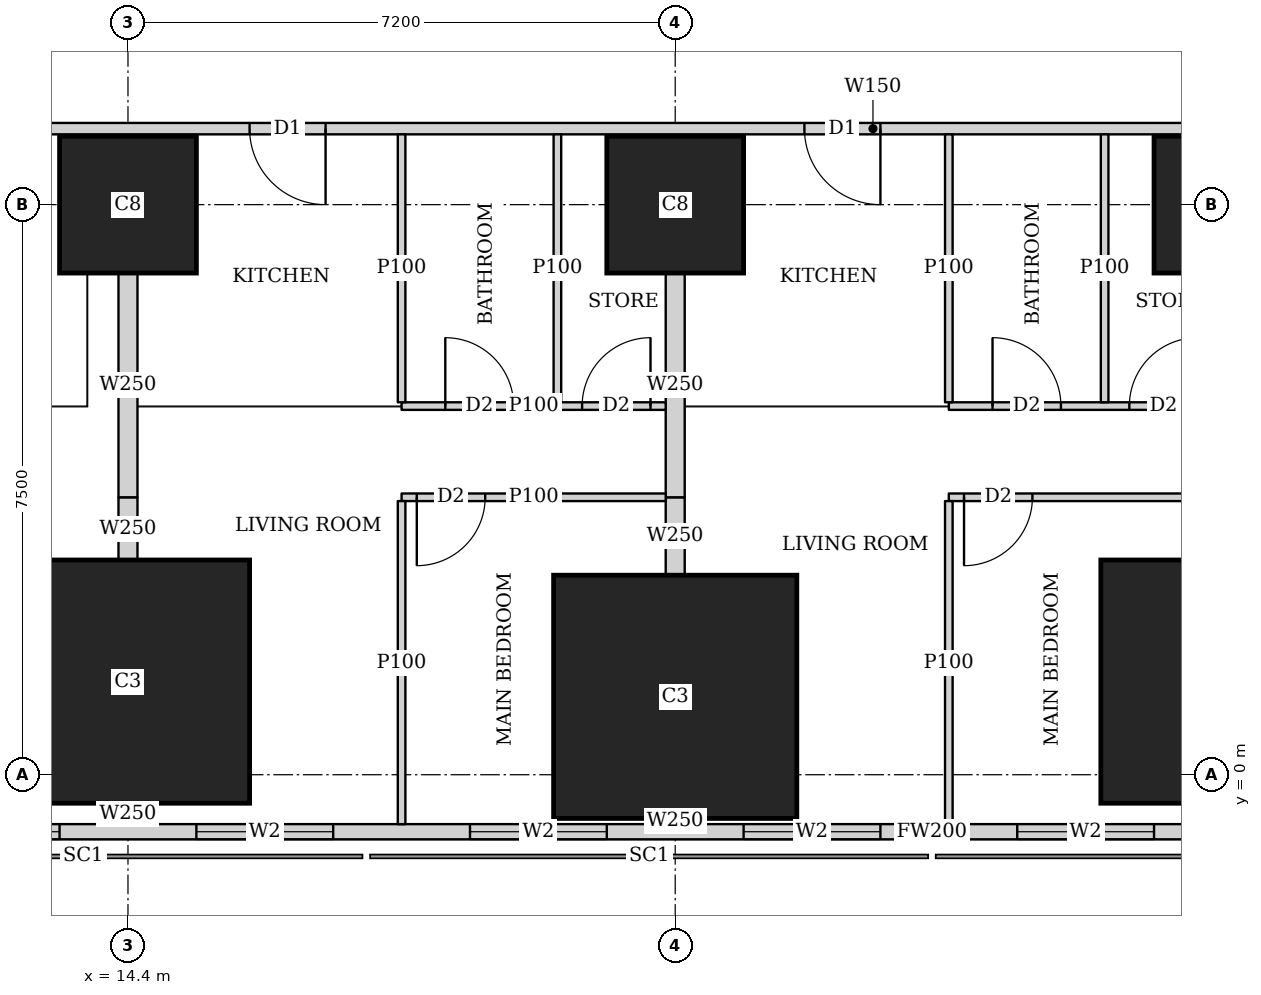
"""IFC4 building model, lengths in metres.
Left out: names, types, materials, properties, quantities, classifications, styles, units other than length and angle.
Written with IfcOpenShell. Run it as: python <this file> out.ifc"""

import sys

from ifc_helpers import new_model, si_unit, direction, frame, frame_2d, origin, origin_2d, place, context, subcontext, project, spatial, rectangle, extrude, element, fill, save


model = new_model("IFC4")
c1 = context("Model", 3, precision=1e-05, world=origin(), true_north=direction((0.0, 1.0)))
c2 = subcontext(c1, "Body", "Model", "MODEL_VIEW")
j1 = project(units=[si_unit("LENGTHUNIT", "METRE"), si_unit("PLANEANGLEUNIT", "RADIAN")], contexts=[c1])
p1 = place(None, origin())
s1 = spatial("IfcSite", under=j1, at=p1, CompositionType="ELEMENT")
p2 = place(p1, origin())
s2 = spatial("IfcBuilding", under=s1, at=p2, CompositionType="ELEMENT")
p3 = place(p2, frame((0.0, 0.0, 20.0)))
s3 = spatial("IfcBuildingStorey", under=s2, at=p3, CompositionType="ELEMENT", Elevation=20.0)
p4 = place(p3, frame((14.4, 1.225, 0.0), z_axis=(0.0, 0.0, 1.0), x_axis=(1.0, 0.0, 0.0)))
e1 = element("IfcColumn", 1, at=p4, inside=s3, PredefinedType="COLUMN", context=c2, shape_type="SweptSolid", body=[
    extrude(rectangle(XDim=3.2, YDim=3.2, at=origin_2d()), origin(), (0.0, 0.0, 1.0), 3.75),
])
p5 = place(p3, frame((21.6, 1.025, -0.3), z_axis=(0.0, 0.0, 1.0), x_axis=(1.0, 0.0, 0.0)))
e2 = element("IfcColumn", 2, at=p5, inside=s3, PredefinedType="COLUMN", context=c2, shape_type="SweptSolid", body=[
    extrude(rectangle(XDim=3.2, YDim=3.2, at=origin_2d()), origin(), (0.0, 0.0, 1.0), 4.05),
])
p6 = place(p3, frame((28.8, 1.225, 0.0), z_axis=(0.0, 0.0, 1.0), x_axis=(1.0, 0.0, 0.0)))
e3 = element("IfcColumn", 3, at=p6, inside=s3, PredefinedType="COLUMN", context=c2, shape_type="SweptSolid", body=[
    extrude(rectangle(XDim=3.2, YDim=3.2, at=origin_2d()), origin(), (0.0, 0.0, 1.0), 3.75),
])
for number, where, z_axis, x_axis in (
    (4, (14.4, 7.5, 0.0), (0.0, 0.0, 1.0), (1.0, 0.0, 0.0)),
    (5, (21.6, 7.5, 0.0), (0.0, 0.0, 1.0), (1.0, 0.0, 0.0)),
    (6, (28.8, 7.5, 0.0), (0.0, 0.0, 1.0), (1.0, 0.0, 0.0)),
):
    element("IfcColumn", number, at=place(p3, frame(where, z_axis=z_axis, x_axis=x_axis)), inside=s3, PredefinedType="COLUMN", context=c2, shape_type="SweptSolid", body=[
        extrude(rectangle(XDim=1.8, YDim=1.8, at=origin_2d()), origin(), (0.0, 0.0, 1.0), 3.75),
    ])
p7 = place(p3, frame((2.163, -0.75, 0.0), z_axis=(0.0, 0.0, 1.0), x_axis=(1.0, 0.0, 0.0)))
e7 = element("IfcWall", 7, at=p7, inside=s3, PredefinedType="SOLIDWALL", context=c2, shape_type="SweptSolid", body=[
    extrude(rectangle(XDim=45.628, YDim=0.2, at=frame_2d((22.814, 0.0))), origin(), (0.0, 0.0, 1.0), 3.5),
])
p8 = place(p7, frame((9.537, 0.0, 0.9)))
e8 = element("IfcOpeningElement", 8, at=p8, cuts=e7, PredefinedType="OPENING", context=c2, shape_type="SweptSolid", body=[
    extrude(rectangle(XDim=1.8, YDim=1.5, at=frame_2d((0.9, 0.75))), frame((0.0, 0.11, 0.0), z_axis=(0.0, -1.0, 0.0), x_axis=(1.0, 0.0, 0.0)), (0.0, 0.0, 1.0), 0.22),
])
p9 = place(p7, frame((13.137, 0.0, 0.9)))
e9 = element("IfcOpeningElement", 9, at=p9, cuts=e7, PredefinedType="OPENING", context=c2, shape_type="SweptSolid", body=[
    extrude(rectangle(XDim=1.8, YDim=1.5, at=frame_2d((0.9, 0.75))), frame((0.0, 0.11, 0.0), z_axis=(0.0, -1.0, 0.0), x_axis=(1.0, 0.0, 0.0)), (0.0, 0.0, 1.0), 0.22),
])
p10 = place(p7, frame((16.737, 0.0, 0.9)))
e10 = element("IfcOpeningElement", 10, at=p10, cuts=e7, PredefinedType="OPENING", context=c2, shape_type="SweptSolid", body=[
    extrude(rectangle(XDim=1.8, YDim=1.5, at=frame_2d((0.9, 0.75))), frame((0.0, 0.11, 0.0), z_axis=(0.0, -1.0, 0.0), x_axis=(1.0, 0.0, 0.0)), (0.0, 0.0, 1.0), 0.22),
])
p11 = place(p7, frame((20.337, 0.0, 0.9)))
e11 = element("IfcOpeningElement", 11, at=p11, cuts=e7, PredefinedType="OPENING", context=c2, shape_type="SweptSolid", body=[
    extrude(rectangle(XDim=1.8, YDim=1.5, at=frame_2d((0.9, 0.75))), frame((0.0, 0.11, 0.0), z_axis=(0.0, -1.0, 0.0), x_axis=(1.0, 0.0, 0.0)), (0.0, 0.0, 1.0), 0.22),
])
p12 = place(p7, frame((23.937, 0.0, 0.9)))
e12 = element("IfcOpeningElement", 12, at=p12, cuts=e7, PredefinedType="OPENING", context=c2, shape_type="SweptSolid", body=[
    extrude(rectangle(XDim=1.8, YDim=1.5, at=frame_2d((0.9, 0.75))), frame((0.0, 0.11, 0.0), z_axis=(0.0, -1.0, 0.0), x_axis=(1.0, 0.0, 0.0)), (0.0, 0.0, 1.0), 0.22),
])
p13 = place(p7, frame((27.537, 0.0, 0.9)))
e13 = element("IfcOpeningElement", 13, at=p13, cuts=e7, PredefinedType="OPENING", context=c2, shape_type="SweptSolid", body=[
    extrude(rectangle(XDim=1.8, YDim=1.5, at=frame_2d((0.9, 0.75))), frame((0.0, 0.11, 0.0), z_axis=(0.0, -1.0, 0.0), x_axis=(1.0, 0.0, 0.0)), (0.0, 0.0, 1.0), 0.22),
])
p14 = place(p7, frame((31.137, 0.0, 0.9)))
e14 = element("IfcOpeningElement", 14, at=p14, cuts=e7, PredefinedType="OPENING", context=c2, shape_type="SweptSolid", body=[
    extrude(rectangle(XDim=1.8, YDim=1.5, at=frame_2d((0.9, 0.75))), frame((0.0, 0.11, 0.0), z_axis=(0.0, -1.0, 0.0), x_axis=(1.0, 0.0, 0.0)), (0.0, 0.0, 1.0), 0.22),
])
p15 = place(p7, frame((34.737, 0.0, 0.9)))
e15 = element("IfcOpeningElement", 15, at=p15, cuts=e7, PredefinedType="OPENING", context=c2, shape_type="SweptSolid", body=[
    extrude(rectangle(XDim=1.8, YDim=1.5, at=frame_2d((0.9, 0.75))), frame((0.0, 0.11, 0.0), z_axis=(0.0, -1.0, 0.0), x_axis=(1.0, 0.0, 0.0)), (0.0, 0.0, 1.0), 0.22),
])
p16 = place(p3, frame((40.054, 8.5, 0.0), z_axis=(0.0, 0.0, 1.0), x_axis=(-1.0, 0.0, 0.0)))
e16 = element("IfcWall", 16, at=p16, inside=s3, PredefinedType="SOLIDWALL", context=c2, shape_type="SweptSolid", body=[
    extrude(rectangle(XDim=31.704, YDim=0.15, at=frame_2d((15.852, 0.0))), origin(), (0.0, 0.0, 1.0), 3.5),
])
p17 = place(p16, frame((27.321, 0.0, 0.0)))
e17 = element("IfcOpeningElement", 17, at=p17, cuts=e16, PredefinedType="OPENING", context=c2, shape_type="SweptSolid", body=[
    extrude(rectangle(XDim=1.0, YDim=2.1, at=frame_2d((0.5, 1.05))), frame((0.0, 0.085, 0.0), z_axis=(0.0, -1.0, 0.0), x_axis=(1.0, 0.0, 0.0)), (0.0, 0.0, 1.0), 0.17),
])
p18 = place(p16, frame((23.054, 0.0, 0.0)))
e18 = element("IfcOpeningElement", 18, at=p18, cuts=e16, PredefinedType="OPENING", context=c2, shape_type="SweptSolid", body=[
    extrude(rectangle(XDim=1.0, YDim=2.1, at=frame_2d((0.5, 1.05))), frame((0.0, 0.085, 0.0), z_axis=(0.0, -1.0, 0.0), x_axis=(1.0, 0.0, 0.0)), (0.0, 0.0, 1.0), 0.17),
])
p19 = place(p16, frame((15.754, 0.0, 0.0)))
e19 = element("IfcOpeningElement", 19, at=p19, cuts=e16, PredefinedType="OPENING", context=c2, shape_type="SweptSolid", body=[
    extrude(rectangle(XDim=1.0, YDim=2.1, at=frame_2d((0.5, 1.05))), frame((0.0, 0.085, 0.0), z_axis=(0.0, -1.0, 0.0), x_axis=(1.0, 0.0, 0.0)), (0.0, 0.0, 1.0), 0.17),
])
p20 = place(p16, frame((5.754, 0.0, 0.0)))
e20 = element("IfcOpeningElement", 20, at=p20, cuts=e16, PredefinedType="OPENING", context=c2, shape_type="SweptSolid", body=[
    extrude(rectangle(XDim=1.0, YDim=2.1, at=frame_2d((0.5, 1.05))), frame((0.0, 0.085, 0.0), z_axis=(0.0, -1.0, 0.0), x_axis=(1.0, 0.0, 0.0)), (0.0, 0.0, 1.0), 0.17),
])
p21 = place(p3, frame((21.475, 3.65, 0.0), z_axis=(0.0, 0.0, 1.0), x_axis=(-1.0, 0.0, 0.0)))
e21 = element("IfcWall", 21, at=p21, inside=s3, PredefinedType="PARTITIONING", context=c2, shape_type="SweptSolid", body=[
    extrude(rectangle(XDim=3.475, YDim=0.1, at=frame_2d((1.738, 0.0))), origin(), (0.0, 0.0, 1.0), 3.5),
])
p22 = place(p21, frame((2.375, 0.0, 0.0)))
e22 = element("IfcOpeningElement", 22, at=p22, cuts=e21, PredefinedType="OPENING", context=c2, shape_type="SweptSolid", body=[
    extrude(rectangle(XDim=0.9, YDim=2.1, at=frame_2d((0.45, 1.05))), frame((0.0, 0.06, 0.0), z_axis=(0.0, -1.0, 0.0), x_axis=(1.0, 0.0, 0.0)), (0.0, 0.0, 1.0), 0.12),
])
p23 = place(p3, frame((21.475, 4.85, 0.0), z_axis=(0.0, 0.0, 1.0), x_axis=(-1.0, 0.0, 0.0)))
e23 = element("IfcWall", 23, at=p23, inside=s3, PredefinedType="PARTITIONING", context=c2, shape_type="SweptSolid", body=[
    extrude(rectangle(XDim=3.475, YDim=0.1, at=frame_2d((1.738, 0.0))), origin(), (0.0, 0.0, 1.0), 3.5),
])
p24 = place(p23, frame((2.0, 0.0, 0.0)))
e24 = element("IfcOpeningElement", 24, at=p24, cuts=e23, PredefinedType="OPENING", context=c2, shape_type="SweptSolid", body=[
    extrude(rectangle(XDim=0.9, YDim=2.1, at=frame_2d((0.45, 1.05))), frame((0.0, 0.06, 0.0), z_axis=(0.0, -1.0, 0.0), x_axis=(1.0, 0.0, 0.0)), (0.0, 0.0, 1.0), 0.12),
])
p25 = place(p23, frame((0.2, 0.0, 0.0)))
e25 = element("IfcOpeningElement", 25, at=p25, cuts=e23, PredefinedType="OPENING", context=c2, shape_type="SweptSolid", body=[
    extrude(rectangle(XDim=0.9, YDim=2.1, at=frame_2d((0.45, 1.05))), frame((0.0, 0.06, 0.0), z_axis=(0.0, -1.0, 0.0), x_axis=(1.0, 0.0, 0.0)), (0.0, 0.0, 1.0), 0.12),
])
p26 = place(p3, frame((18.0, -0.65, 0.0), z_axis=(0.0, 0.0, 1.0), x_axis=(0.0, 1.0, 0.0)))
e26 = element("IfcWall", 26, at=p26, inside=s3, PredefinedType="PARTITIONING", context=c2, shape_type="SweptSolid", body=[
    extrude(rectangle(XDim=4.25, YDim=0.1, at=frame_2d((2.125, 0.0))), origin(), (0.0, 0.0, 1.0), 2.05),
])
for number, where, z_axis, x_axis in (
    (27, (18.0, 4.9, 0.0), (0.0, 0.0, 1.0), (0.0, 1.0, 0.0)),
    (28, (20.05, 4.9, 0.0), (0.0, 0.0, 1.0), (0.0, 1.0, 0.0)),
):
    element("IfcWall", number, at=place(p3, frame(where, z_axis=z_axis, x_axis=x_axis)), inside=s3, PredefinedType="PARTITIONING", context=c2, shape_type="SweptSolid", body=[
        extrude(rectangle(XDim=3.525, YDim=0.1, at=frame_2d((1.763, 0.0))), origin(), (0.0, 0.0, 1.0), 3.5),
    ])
p27 = place(p3, frame((14.4, -0.65, 0.0), z_axis=(0.0, 0.0, 1.0), x_axis=(0.0, 1.0, 0.0)))
e29 = element("IfcWall", 29, at=p27, inside=s3, PredefinedType="SOLIDWALL", context=c2, shape_type="SweptSolid", body=[
    extrude(rectangle(XDim=0.274, YDim=0.25, at=frame_2d((0.137, 0.0))), origin(), (0.0, 0.0, 1.0), 2.05),
])
p28 = place(p3, frame((14.4, 2.826, 0.0), z_axis=(0.0, 0.0, 1.0), x_axis=(0.0, 1.0, 0.0)))
e30 = element("IfcWall", 30, at=p28, inside=s3, PredefinedType="SOLIDWALL", context=c2, shape_type="SweptSolid", body=[
    extrude(rectangle(XDim=0.824, YDim=0.25, at=frame_2d((0.412, 0.0))), origin(), (0.0, 0.0, 1.0), 2.05),
])
p29 = place(p3, frame((14.4, 3.65, 0.0), z_axis=(0.0, 0.0, 1.0), x_axis=(0.0, 1.0, 0.0)))
e31 = element("IfcWall", 31, at=p29, inside=s3, PredefinedType="SOLIDWALL", context=c2, shape_type="SweptSolid", body=[
    extrude(rectangle(XDim=2.949, YDim=0.25, at=frame_2d((1.475, 0.0))), origin(), (0.0, 0.0, 1.0), 3.5),
])
p30 = place(p3, frame((32.275, 3.65, 0.0), z_axis=(0.0, 0.0, 1.0), x_axis=(-1.0, 0.0, 0.0)))
e32 = element("IfcWall", 32, at=p30, inside=s3, PredefinedType="PARTITIONING", context=c2, shape_type="SweptSolid", body=[
    extrude(rectangle(XDim=7.075, YDim=0.1, at=frame_2d((3.538, 0.0))), origin(), (0.0, 0.0, 1.0), 3.5),
])
p31 = place(p30, frame((5.975, 0.0, 0.0)))
e33 = element("IfcOpeningElement", 33, at=p31, cuts=e32, PredefinedType="OPENING", context=c2, shape_type="SweptSolid", body=[
    extrude(rectangle(XDim=0.9, YDim=2.1, at=frame_2d((0.45, 1.05))), frame((0.0, 0.06, 0.0), z_axis=(0.0, -1.0, 0.0), x_axis=(1.0, 0.0, 0.0)), (0.0, 0.0, 1.0), 0.12),
])
p32 = place(p30, frame((0.95, 0.0, 0.0)))
e34 = element("IfcOpeningElement", 34, at=p32, cuts=e32, PredefinedType="OPENING", context=c2, shape_type="SweptSolid", body=[
    extrude(rectangle(XDim=0.9, YDim=2.1, at=frame_2d((0.45, 1.05))), frame((0.0, 0.06, 0.0), z_axis=(0.0, -1.0, 0.0), x_axis=(1.0, 0.0, 0.0)), (0.0, 0.0, 1.0), 0.12),
])
p33 = place(p3, frame((32.275, 4.85, 0.0), z_axis=(0.0, 0.0, 1.0), x_axis=(-1.0, 0.0, 0.0)))
e35 = element("IfcWall", 35, at=p33, inside=s3, PredefinedType="PARTITIONING", context=c2, shape_type="SweptSolid", body=[
    extrude(rectangle(XDim=7.075, YDim=0.1, at=frame_2d((3.538, 0.0))), origin(), (0.0, 0.0, 1.0), 3.5),
])
p34 = place(p33, frame((5.6, 0.0, 0.0)))
e36 = element("IfcOpeningElement", 36, at=p34, cuts=e35, PredefinedType="OPENING", context=c2, shape_type="SweptSolid", body=[
    extrude(rectangle(XDim=0.9, YDim=2.1, at=frame_2d((0.45, 1.05))), frame((0.0, 0.06, 0.0), z_axis=(0.0, -1.0, 0.0), x_axis=(1.0, 0.0, 0.0)), (0.0, 0.0, 1.0), 0.12),
])
p35 = place(p33, frame((2.225, 0.0, 0.0)))
e37 = element("IfcOpeningElement", 37, at=p35, cuts=e35, PredefinedType="OPENING", context=c2, shape_type="SweptSolid", body=[
    extrude(rectangle(XDim=0.9, YDim=2.1, at=frame_2d((0.45, 1.05))), frame((0.0, 0.06, 0.0), z_axis=(0.0, -1.0, 0.0), x_axis=(1.0, 0.0, 0.0)), (0.0, 0.0, 1.0), 0.12),
])
p36 = place(p33, frame((3.8, 0.0, 0.0)))
e38 = element("IfcOpeningElement", 38, at=p36, cuts=e35, PredefinedType="OPENING", context=c2, shape_type="SweptSolid", body=[
    extrude(rectangle(XDim=0.9, YDim=2.1, at=frame_2d((0.45, 1.05))), frame((0.0, 0.06, 0.0), z_axis=(0.0, -1.0, 0.0), x_axis=(1.0, 0.0, 0.0)), (0.0, 0.0, 1.0), 0.12),
])
p37 = place(p33, frame((0.425, 0.0, 0.0)))
e39 = element("IfcOpeningElement", 39, at=p37, cuts=e35, PredefinedType="OPENING", context=c2, shape_type="SweptSolid", body=[
    extrude(rectangle(XDim=0.9, YDim=2.1, at=frame_2d((0.45, 1.05))), frame((0.0, 0.06, 0.0), z_axis=(0.0, -1.0, 0.0), x_axis=(1.0, 0.0, 0.0)), (0.0, 0.0, 1.0), 0.12),
])
p38 = place(p3, frame((25.2, -0.65, 0.0), z_axis=(0.0, 0.0, 1.0), x_axis=(0.0, 1.0, 0.0)))
e40 = element("IfcWall", 40, at=p38, inside=s3, PredefinedType="PARTITIONING", context=c2, shape_type="SweptSolid", body=[
    extrude(rectangle(XDim=4.25, YDim=0.1, at=frame_2d((2.125, 0.0))), origin(), (0.0, 0.0, 1.0), 2.05),
])
for number, where, z_axis, x_axis in (
    (41, (25.2, 4.9, 0.0), (0.0, 0.0, 1.0), (0.0, 1.0, 0.0)),
    (42, (27.25, 4.9, 0.0), (0.0, 0.0, 1.0), (0.0, 1.0, 0.0)),
):
    element("IfcWall", number, at=place(p3, frame(where, z_axis=z_axis, x_axis=x_axis)), inside=s3, PredefinedType="PARTITIONING", context=c2, shape_type="SweptSolid", body=[
        extrude(rectangle(XDim=3.525, YDim=0.1, at=frame_2d((1.763, 0.0))), origin(), (0.0, 0.0, 1.0), 3.5),
    ])
p39 = place(p3, frame((21.6, -0.65, 0.0), z_axis=(0.0, 0.0, 1.0), x_axis=(0.0, 1.0, 0.0)))
e43 = element("IfcWall", 43, at=p39, inside=s3, PredefinedType="SOLIDWALL", context=c2, shape_type="SweptSolid", body=[
    extrude(rectangle(XDim=0.074, YDim=0.25, at=frame_2d((0.037, 0.0))), origin(), (0.0, 0.0, 1.0), 2.05),
])
p40 = place(p3, frame((21.6, 2.626, 0.0), z_axis=(0.0, 0.0, 1.0), x_axis=(0.0, 1.0, 0.0)))
e44 = element("IfcWall", 44, at=p40, inside=s3, PredefinedType="SOLIDWALL", context=c2, shape_type="SweptSolid", body=[
    extrude(rectangle(XDim=1.024, YDim=0.25, at=frame_2d((0.512, 0.0))), origin(), (0.0, 0.0, 1.0), 2.05),
])
p41 = place(p3, frame((21.6, 3.65, 0.0), z_axis=(0.0, 0.0, 1.0), x_axis=(0.0, 1.0, 0.0)))
e45 = element("IfcWall", 45, at=p41, inside=s3, PredefinedType="SOLIDWALL", context=c2, shape_type="SweptSolid", body=[
    extrude(rectangle(XDim=2.949, YDim=0.25, at=frame_2d((1.475, 0.0))), origin(), (0.0, 0.0, 1.0), 3.5),
])
p42 = place(p8, origin())
e46 = element("IfcWindow", 46, at=p42, inside=s3, PartitioningType="SINGLE_PANEL", PredefinedType="WINDOW", context=c2, shape_type="SweptSolid", body=[
    extrude(rectangle(XDim=1.8, YDim=1.5, at=frame_2d((0.9, 0.75))), frame((0.0, 0.03, 0.0), z_axis=(0.0, -1.0, 0.0), x_axis=(1.0, 0.0, 0.0)), (0.0, 0.0, 1.0), 0.06),
])
fill(e8, e46)
p43 = place(p9, origin())
e47 = element("IfcWindow", 47, at=p43, inside=s3, PartitioningType="SINGLE_PANEL", PredefinedType="WINDOW", context=c2, shape_type="SweptSolid", body=[
    extrude(rectangle(XDim=1.8, YDim=1.5, at=frame_2d((0.9, 0.75))), frame((0.0, 0.03, 0.0), z_axis=(0.0, -1.0, 0.0), x_axis=(1.0, 0.0, 0.0)), (0.0, 0.0, 1.0), 0.06),
])
fill(e9, e47)
p44 = place(p10, origin())
e48 = element("IfcWindow", 48, at=p44, inside=s3, PartitioningType="SINGLE_PANEL", PredefinedType="WINDOW", context=c2, shape_type="SweptSolid", body=[
    extrude(rectangle(XDim=1.8, YDim=1.5, at=frame_2d((0.9, 0.75))), frame((0.0, 0.03, 0.0), z_axis=(0.0, -1.0, 0.0), x_axis=(1.0, 0.0, 0.0)), (0.0, 0.0, 1.0), 0.06),
])
fill(e10, e48)
p45 = place(p11, origin())
e49 = element("IfcWindow", 49, at=p45, inside=s3, PartitioningType="SINGLE_PANEL", PredefinedType="WINDOW", context=c2, shape_type="SweptSolid", body=[
    extrude(rectangle(XDim=1.8, YDim=1.5, at=frame_2d((0.9, 0.75))), frame((0.0, 0.03, 0.0), z_axis=(0.0, -1.0, 0.0), x_axis=(1.0, 0.0, 0.0)), (0.0, 0.0, 1.0), 0.06),
])
fill(e11, e49)
p46 = place(p12, origin())
e50 = element("IfcWindow", 50, at=p46, inside=s3, PartitioningType="SINGLE_PANEL", PredefinedType="WINDOW", context=c2, shape_type="SweptSolid", body=[
    extrude(rectangle(XDim=1.8, YDim=1.5, at=frame_2d((0.9, 0.75))), frame((0.0, 0.03, 0.0), z_axis=(0.0, -1.0, 0.0), x_axis=(1.0, 0.0, 0.0)), (0.0, 0.0, 1.0), 0.06),
])
fill(e12, e50)
p47 = place(p22, origin())
e51 = element("IfcDoor", 51, at=p47, inside=s3, OperationType="SINGLE_SWING_RIGHT", PredefinedType="DOOR", context=c2, shape_type="SweptSolid", body=[
    extrude(rectangle(XDim=0.9, YDim=2.1, at=frame_2d((0.45, 1.05))), frame((0.0, 0.025, 0.0), z_axis=(0.0, -1.0, 0.0), x_axis=(1.0, 0.0, 0.0)), (0.0, 0.0, 1.0), 0.05),
])
fill(e22, e51)
p48 = place(p24, origin())
e52 = element("IfcDoor", 52, at=p48, inside=s3, OperationType="SINGLE_SWING_LEFT", PredefinedType="DOOR", context=c2, shape_type="SweptSolid", body=[
    extrude(rectangle(XDim=0.9, YDim=2.1, at=frame_2d((0.45, 1.05))), frame((0.0, 0.025, 0.0), z_axis=(0.0, -1.0, 0.0), x_axis=(1.0, 0.0, 0.0)), (0.0, 0.0, 1.0), 0.05),
])
fill(e24, e52)
p49 = place(p25, origin())
e53 = element("IfcDoor", 53, at=p49, inside=s3, OperationType="SINGLE_SWING_RIGHT", PredefinedType="DOOR", context=c2, shape_type="SweptSolid", body=[
    extrude(rectangle(XDim=0.9, YDim=2.1, at=frame_2d((0.45, 1.05))), frame((0.0, 0.025, 0.0), z_axis=(0.0, -1.0, 0.0), x_axis=(1.0, 0.0, 0.0)), (0.0, 0.0, 1.0), 0.05),
])
fill(e25, e53)
p50 = place(p18, origin())
e54 = element("IfcDoor", 54, at=p50, inside=s3, OperationType="SINGLE_SWING_LEFT", PredefinedType="DOOR", context=c2, shape_type="SweptSolid", body=[
    extrude(rectangle(XDim=1.0, YDim=2.1, at=frame_2d((0.5, 1.05))), frame((0.0, 0.025, 0.0), z_axis=(0.0, -1.0, 0.0), x_axis=(1.0, 0.0, 0.0)), (0.0, 0.0, 1.0), 0.05),
])
fill(e18, e54)
p51 = place(p31, origin())
e55 = element("IfcDoor", 55, at=p51, inside=s3, OperationType="SINGLE_SWING_RIGHT", PredefinedType="DOOR", context=c2, shape_type="SweptSolid", body=[
    extrude(rectangle(XDim=0.9, YDim=2.1, at=frame_2d((0.45, 1.05))), frame((0.0, 0.025, 0.0), z_axis=(0.0, -1.0, 0.0), x_axis=(1.0, 0.0, 0.0)), (0.0, 0.0, 1.0), 0.05),
])
fill(e33, e55)
p52 = place(p34, origin())
e56 = element("IfcDoor", 56, at=p52, inside=s3, OperationType="SINGLE_SWING_LEFT", PredefinedType="DOOR", context=c2, shape_type="SweptSolid", body=[
    extrude(rectangle(XDim=0.9, YDim=2.1, at=frame_2d((0.45, 1.05))), frame((0.0, 0.025, 0.0), z_axis=(0.0, -1.0, 0.0), x_axis=(1.0, 0.0, 0.0)), (0.0, 0.0, 1.0), 0.05),
])
fill(e36, e56)
p53 = place(p36, origin())
e57 = element("IfcDoor", 57, at=p53, inside=s3, OperationType="SINGLE_SWING_RIGHT", PredefinedType="DOOR", context=c2, shape_type="SweptSolid", body=[
    extrude(rectangle(XDim=0.9, YDim=2.1, at=frame_2d((0.45, 1.05))), frame((0.0, 0.025, 0.0), z_axis=(0.0, -1.0, 0.0), x_axis=(1.0, 0.0, 0.0)), (0.0, 0.0, 1.0), 0.05),
])
fill(e38, e57)
p54 = place(p19, origin())
e58 = element("IfcDoor", 58, at=p54, inside=s3, OperationType="SINGLE_SWING_LEFT", PredefinedType="DOOR", context=c2, shape_type="SweptSolid", body=[
    extrude(rectangle(XDim=1.0, YDim=2.1, at=frame_2d((0.5, 1.05))), frame((0.0, 0.025, 0.0), z_axis=(0.0, -1.0, 0.0), x_axis=(1.0, 0.0, 0.0)), (0.0, 0.0, 1.0), 0.05),
])
fill(e19, e58)
save(model, sys.argv[1])
